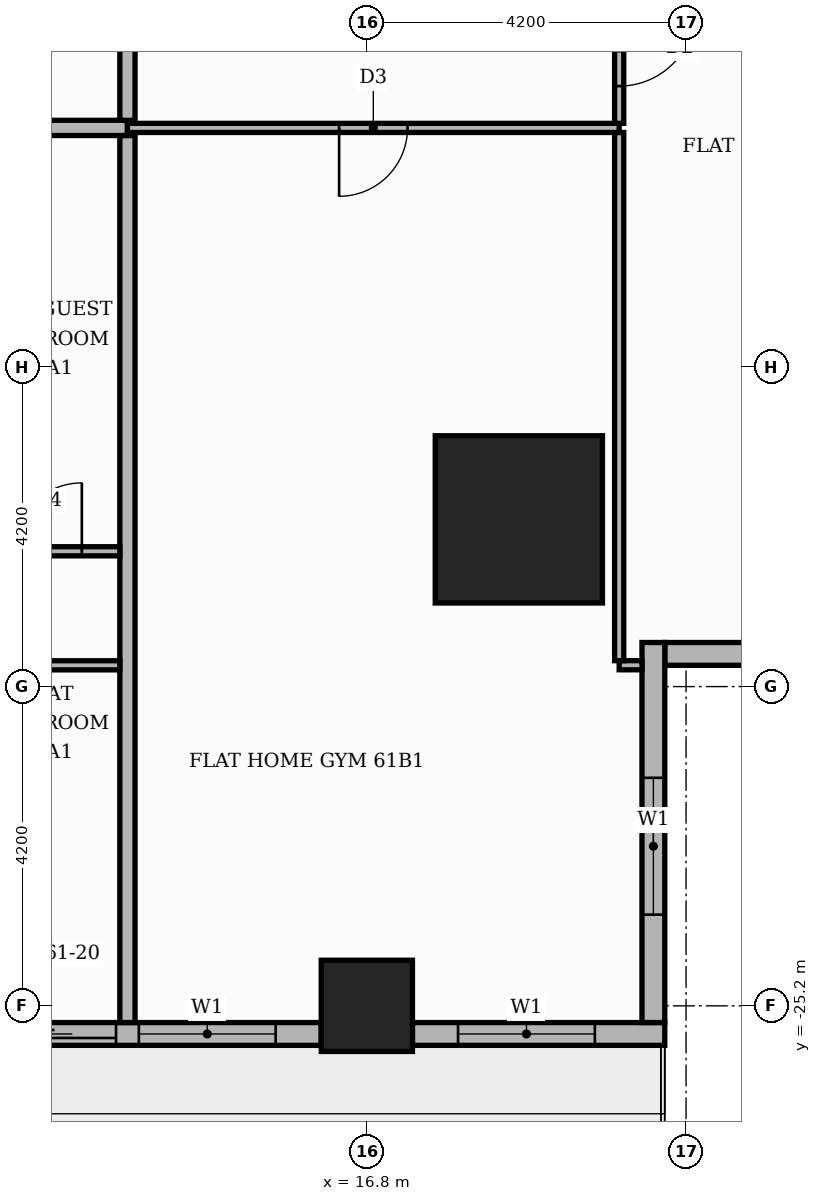
"""IFC4 building model, lengths in metres.
Left out: names, types, materials, properties, quantities, classifications, styles, units other than length and angle.
Written with IfcOpenShell. Run it as: python <this file> out.ifc"""

import sys

from ifc_helpers import new_model, si_unit, direction, frame, frame_2d, origin, origin_2d, place, context, subcontext, project, spatial, rectangle, extrude, element, fill, save


model = new_model("IFC4")
c1 = context("Model", 3, precision=1e-05, world=origin(), true_north=direction((0.0, 1.0)))
c2 = subcontext(c1, "Body", "Model", "MODEL_VIEW")
j1 = project(units=[si_unit("LENGTHUNIT", "METRE"), si_unit("PLANEANGLEUNIT", "RADIAN")], contexts=[c1])
p1 = place(None, origin())
s1 = spatial("IfcSite", under=j1, at=p1, CompositionType="ELEMENT")
p2 = place(p1, origin())
s2 = spatial("IfcBuilding", under=s1, at=p2, CompositionType="ELEMENT")
p3 = place(p2, frame((0.0, 0.0, 256.2)))
s3 = spatial("IfcBuildingStorey", under=s2, at=p3, CompositionType="ELEMENT", Elevation=256.2)
p4 = place(p3, frame((18.8, -18.8, 0.0), z_axis=(0.0, 0.0, 1.0), x_axis=(1.0, 0.0, 0.0)))
e1 = element("IfcColumn", 1, at=p4, inside=s3, PredefinedType="COLUMN", context=c2, shape_type="SweptSolid", body=[
    extrude(rectangle(XDim=2.2, YDim=2.2, at=origin_2d()), origin(), (0.0, 0.0, 1.0), 3.9),
])
p5 = place(p3, frame((16.8, -25.2, 0.0), z_axis=(0.0, 0.0, 1.0), x_axis=(1.0, 0.0, 0.0)))
e2 = element("IfcColumn", 2, at=p5, inside=s3, PredefinedType="COLUMN", context=c2, shape_type="SweptSolid", body=[
    extrude(rectangle(XDim=1.2, YDim=1.2, at=origin_2d()), origin(), (0.0, 0.0, 1.0), 3.9),
])
p6 = place(p3, frame((20.72, -20.57, 0.0), z_axis=(0.0, 0.0, 1.0), x_axis=(1.0, 0.0, 0.0)))
e3 = element("IfcWall", 3, at=p6, inside=s3, PredefinedType="STANDARD", context=c2, shape_type="SweptSolid", body=[
    extrude(rectangle(XDim=5.0, YDim=0.3, at=frame_2d((2.5, 0.0))), origin(), (0.0, 0.0, 1.0), 3.48),
])
p7 = place(p6, frame((1.48, 0.0, 0.9)))
e4 = element("IfcOpeningElement", 4, at=p7, cuts=e3, PredefinedType="OPENING", context=c2, shape_type="SweptSolid", body=[
    extrude(rectangle(XDim=1.8, YDim=2.1, at=frame_2d((0.9, 1.05))), frame((0.0, 0.16, 0.0), z_axis=(0.0, -1.0, 0.0), x_axis=(1.0, 0.0, 0.0)), (0.0, 0.0, 1.0), 0.32),
])
p8 = place(p3, frame((9.0, -25.57, 0.0), z_axis=(0.0, 0.0, 1.0), x_axis=(1.0, 0.0, 0.0)))
e5 = element("IfcWall", 5, at=p8, inside=s3, PredefinedType="STANDARD", context=c2, shape_type="SweptSolid", body=[
    extrude(rectangle(XDim=7.2, YDim=0.3, at=frame_2d((3.6, 0.0))), origin(), (0.0, 0.0, 1.0), 3.48),
])
p9 = place(p8, frame((0.6, 0.0, 0.9)))
e6 = element("IfcOpeningElement", 6, at=p9, cuts=e5, PredefinedType="OPENING", context=c2, shape_type="SweptSolid", body=[
    extrude(rectangle(XDim=1.8, YDim=2.1, at=frame_2d((0.9, 1.05))), frame((0.0, 0.16, 0.0), z_axis=(0.0, -1.0, 0.0), x_axis=(1.0, 0.0, 0.0)), (0.0, 0.0, 1.0), 0.32),
])
p10 = place(p8, frame((2.7, 0.0, 0.0)))
e7 = element("IfcOpeningElement", 7, at=p10, cuts=e5, PredefinedType="OPENING", context=c2, shape_type="SweptSolid", body=[
    extrude(rectangle(XDim=1.8, YDim=2.4, at=frame_2d((0.9, 1.2))), frame((0.0, 0.16, 0.0), z_axis=(0.0, -1.0, 0.0), x_axis=(1.0, 0.0, 0.0)), (0.0, 0.0, 1.0), 0.32),
])
p11 = place(p8, frame((4.8, 0.0, 0.9)))
e8 = element("IfcOpeningElement", 8, at=p11, cuts=e5, PredefinedType="OPENING", context=c2, shape_type="SweptSolid", body=[
    extrude(rectangle(XDim=1.8, YDim=2.1, at=frame_2d((0.9, 1.05))), frame((0.0, 0.16, 0.0), z_axis=(0.0, -1.0, 0.0), x_axis=(1.0, 0.0, 0.0)), (0.0, 0.0, 1.0), 0.32),
])
p12 = place(p3, frame((17.4, -25.57, 0.0), z_axis=(0.0, 0.0, 1.0), x_axis=(1.0, 0.0, 0.0)))
e9 = element("IfcWall", 9, at=p12, inside=s3, PredefinedType="STANDARD", context=c2, shape_type="SweptSolid", body=[
    extrude(rectangle(XDim=3.32, YDim=0.3, at=frame_2d((1.66, 0.0))), origin(), (0.0, 0.0, 1.0), 3.48),
])
p13 = place(p12, frame((0.6, 0.0, 0.9)))
e10 = element("IfcOpeningElement", 10, at=p13, cuts=e9, PredefinedType="OPENING", context=c2, shape_type="SweptSolid", body=[
    extrude(rectangle(XDim=1.8, YDim=2.1, at=frame_2d((0.9, 1.05))), frame((0.0, 0.16, 0.0), z_axis=(0.0, -1.0, 0.0), x_axis=(1.0, 0.0, 0.0)), (0.0, 0.0, 1.0), 0.32),
])
p14 = place(p3, frame((20.57, -25.42, 0.0), z_axis=(0.0, 0.0, 1.0), x_axis=(0.0, 1.0, 0.0)))
e11 = element("IfcWall", 11, at=p14, inside=s3, PredefinedType="STANDARD", context=c2, shape_type="SweptSolid", body=[
    extrude(rectangle(XDim=5.0, YDim=0.3, at=frame_2d((2.5, 0.0))), origin(), (0.0, 0.0, 1.0), 3.48),
])
p15 = place(p14, frame((1.42, 0.0, 0.9)))
e12 = element("IfcOpeningElement", 12, at=p15, cuts=e11, PredefinedType="OPENING", context=c2, shape_type="SweptSolid", body=[
    extrude(rectangle(XDim=1.8, YDim=2.1, at=frame_2d((0.9, 1.05))), frame((0.0, 0.16, 0.0), z_axis=(0.0, -1.0, 0.0), x_axis=(1.0, 0.0, 0.0)), (0.0, 0.0, 1.0), 0.32),
])
p16 = place(p3, frame((13.65, -25.42, 0.0), z_axis=(0.0, 0.0, 1.0), x_axis=(0.0, 1.0, 0.0)))
e13 = element("IfcWall", 13, at=p16, inside=s3, PredefinedType="PARTITIONING", context=c2, shape_type="SweptSolid", body=[
    extrude(rectangle(XDim=11.67, YDim=0.2, at=frame_2d((5.835, 0.0))), origin(), (0.0, 0.0, 1.0), 3.48),
])
p17 = place(p3, frame((7.65, -20.72, 0.0), z_axis=(0.0, 0.0, 1.0), x_axis=(1.0, 0.0, 0.0)))
e14 = element("IfcWall", 14, at=p17, inside=s3, PredefinedType="PARTITIONING", context=c2, shape_type="SweptSolid", body=[
    extrude(rectangle(XDim=5.9, YDim=0.12, at=frame_2d((2.95, 0.0))), origin(), (0.0, 0.0, 1.0), 3.48),
])
p18 = place(p17, frame((1.35, 0.0, 0.0)))
e15 = element("IfcOpeningElement", 15, at=p18, cuts=e14, PredefinedType="OPENING", context=c2, shape_type="SweptSolid", body=[
    extrude(rectangle(XDim=0.9, YDim=2.1, at=frame_2d((0.45, 1.05))), frame((0.0, 0.07, 0.0), z_axis=(0.0, -1.0, 0.0), x_axis=(1.0, 0.0, 0.0)), (0.0, 0.0, 1.0), 0.14),
])
p19 = place(p3, frame((20.12, -20.719, 0.0), z_axis=(0.0, 0.0, 1.0), x_axis=(1.0, 0.0, 0.0)))
e16 = element("IfcWall", 16, at=p19, inside=s3, PredefinedType="PARTITIONING", context=c2, shape_type="SweptSolid", body=[
    extrude(rectangle(XDim=0.301, YDim=0.12, at=frame_2d((0.15, 0.0))), origin(), (0.0, 0.0, 1.0), 3.48),
])
p20 = place(p3, frame((20.12, -20.659, 0.0), z_axis=(0.0, 0.0, 1.0), x_axis=(0.0, 1.0, 0.0)))
e17 = element("IfcWall", 17, at=p20, inside=s3, PredefinedType="PARTITIONING", context=c2, shape_type="SweptSolid", body=[
    extrude(rectangle(XDim=6.949, YDim=0.12, at=frame_2d((3.475, 0.0))), origin(), (0.0, 0.0, 1.0), 3.48),
])
p21 = place(p3, frame((-7.35, -19.22, 0.0), z_axis=(0.0, 0.0, 1.0), x_axis=(1.0, 0.0, 0.0)))
e18 = element("IfcWall", 18, at=p21, inside=s3, PredefinedType="PARTITIONING", context=c2, shape_type="SweptSolid", body=[
    extrude(rectangle(XDim=20.9, YDim=0.12, at=frame_2d((10.45, 0.0))), origin(), (0.0, 0.0, 1.0), 3.48),
])
p22 = place(p21, frame((2.7, 0.0, 0.0)))
e19 = element("IfcOpeningElement", 19, at=p22, cuts=e18, PredefinedType="OPENING", context=c2, shape_type="SweptSolid", body=[
    extrude(rectangle(XDim=0.9, YDim=2.1, at=frame_2d((0.45, 1.05))), frame((0.0, 0.07, 0.0), z_axis=(0.0, -1.0, 0.0), x_axis=(1.0, 0.0, 0.0)), (0.0, 0.0, 1.0), 0.14),
])
p23 = place(p21, frame((7.95, 0.0, 0.0)))
e20 = element("IfcOpeningElement", 20, at=p23, cuts=e18, PredefinedType="OPENING", context=c2, shape_type="SweptSolid", body=[
    extrude(rectangle(XDim=0.9, YDim=2.1, at=frame_2d((0.45, 1.05))), frame((0.0, 0.07, 0.0), z_axis=(0.0, -1.0, 0.0), x_axis=(1.0, 0.0, 0.0)), (0.0, 0.0, 1.0), 0.14),
])
p24 = place(p21, frame((13.05, 0.0, 0.0)))
e21 = element("IfcOpeningElement", 21, at=p24, cuts=e18, PredefinedType="OPENING", context=c2, shape_type="SweptSolid", body=[
    extrude(rectangle(XDim=0.9, YDim=2.1, at=frame_2d((0.45, 1.05))), frame((0.0, 0.07, 0.0), z_axis=(0.0, -1.0, 0.0), x_axis=(1.0, 0.0, 0.0)), (0.0, 0.0, 1.0), 0.14),
])
p25 = place(p21, frame((17.25, 0.0, 0.0)))
e22 = element("IfcOpeningElement", 22, at=p25, cuts=e18, PredefinedType="OPENING", context=c2, shape_type="SweptSolid", body=[
    extrude(rectangle(XDim=0.9, YDim=2.1, at=frame_2d((0.45, 1.05))), frame((0.0, 0.07, 0.0), z_axis=(0.0, -1.0, 0.0), x_axis=(1.0, 0.0, 0.0)), (0.0, 0.0, 1.0), 0.14),
])
p26 = place(p21, frame((19.5, 0.0, 0.0)))
e23 = element("IfcOpeningElement", 23, at=p26, cuts=e18, PredefinedType="OPENING", context=c2, shape_type="SweptSolid", body=[
    extrude(rectangle(XDim=0.9, YDim=2.1, at=frame_2d((0.45, 1.05))), frame((0.0, 0.07, 0.0), z_axis=(0.0, -1.0, 0.0), x_axis=(1.0, 0.0, 0.0)), (0.0, 0.0, 1.0), 0.14),
])
p27 = place(p3, frame((-25.42, -13.65, 0.0), z_axis=(0.0, 0.0, 1.0), x_axis=(1.0, 0.0, 0.0)))
e24 = element("IfcWall", 24, at=p27, inside=s3, PredefinedType="PARTITIONING", context=c2, shape_type="SweptSolid", body=[
    extrude(rectangle(XDim=39.07, YDim=0.2, at=frame_2d((19.535, 0.0))), origin(), (0.0, 0.0, 1.0), 3.48),
])
p28 = place(p27, frame((14.37, 0.0, 0.0)))
e25 = element("IfcOpeningElement", 25, at=p28, cuts=e24, PredefinedType="OPENING", context=c2, shape_type="SweptSolid", body=[
    extrude(rectangle(XDim=1.1, YDim=2.4, at=frame_2d((0.55, 1.2))), frame((0.0, 0.11, 0.0), z_axis=(0.0, -1.0, 0.0), x_axis=(1.0, 0.0, 0.0)), (0.0, 0.0, 1.0), 0.22),
])
p29 = place(p3, frame((13.65, -13.65, 0.0), z_axis=(0.0, 0.0, 1.0), x_axis=(1.0, 0.0, 0.0)))
e26 = element("IfcWall", 26, at=p29, inside=s3, PredefinedType="PARTITIONING", context=c2, shape_type="SweptSolid", body=[
    extrude(rectangle(XDim=6.47, YDim=0.12, at=frame_2d((3.235, 0.0))), origin(), (0.0, 0.0, 1.0), 3.48),
])
p30 = place(p29, frame((2.785, 0.0, 0.0)))
e27 = element("IfcOpeningElement", 27, at=p30, cuts=e26, PredefinedType="OPENING", context=c2, shape_type="SweptSolid", body=[
    extrude(rectangle(XDim=0.9, YDim=2.1, at=frame_2d((0.45, 1.05))), frame((0.0, 0.07, 0.0), z_axis=(0.0, -1.0, 0.0), x_axis=(1.0, 0.0, 0.0)), (0.0, 0.0, 1.0), 0.14),
])
p31 = place(p3, frame((20.12, -13.59, 0.0), z_axis=(0.0, 0.0, 1.0), x_axis=(0.0, 1.0, 0.0)))
e28 = element("IfcWall", 28, at=p31, inside=s3, PredefinedType="PARTITIONING", context=c2, shape_type="SweptSolid", body=[
    extrude(rectangle(XDim=1.98, YDim=0.12, at=frame_2d((0.99, 0.0))), origin(), (0.0, 0.0, 1.0), 3.48),
])
p32 = place(p31, frame((0.49, 0.0, 0.0)))
e29 = element("IfcOpeningElement", 29, at=p32, cuts=e28, PredefinedType="OPENING", context=c2, shape_type="SweptSolid", body=[
    extrude(rectangle(XDim=1.0, YDim=2.1, at=frame_2d((0.5, 1.05))), frame((0.0, 0.07, 0.0), z_axis=(0.0, -1.0, 0.0), x_axis=(1.0, 0.0, 0.0)), (0.0, 0.0, 1.0), 0.14),
])
p33 = place(p3, frame((13.65, -13.55, 0.0), z_axis=(0.0, 0.0, 1.0), x_axis=(0.0, 1.0, 0.0)))
e30 = element("IfcWall", 30, at=p33, inside=s3, PredefinedType="PARTITIONING", context=c2, shape_type="SweptSolid", body=[
    extrude(rectangle(XDim=2.45, YDim=0.2, at=frame_2d((1.225, 0.0))), origin(), (0.0, 0.0, 1.0), 3.48),
])
p34 = place(p10, origin())
e31 = element("IfcDoor", 31, at=p34, inside=s3, OperationType="SLIDING_TO_RIGHT", PredefinedType="DOOR", context=c2, shape_type="SweptSolid", body=[
    extrude(rectangle(XDim=1.8, YDim=2.4, at=frame_2d((0.9, 1.2))), frame((0.0, 0.025, 0.0), z_axis=(0.0, -1.0, 0.0), x_axis=(1.0, 0.0, 0.0)), (0.0, 0.0, 1.0), 0.05),
])
fill(e7, e31)
p35 = place(p11, origin())
e32 = element("IfcWindow", 32, at=p35, inside=s3, PartitioningType="SINGLE_PANEL", PredefinedType="WINDOW", context=c2, shape_type="SweptSolid", body=[
    extrude(rectangle(XDim=1.8, YDim=2.1, at=frame_2d((0.9, 1.05))), frame((0.0, 0.03, 0.0), z_axis=(0.0, -1.0, 0.0), x_axis=(1.0, 0.0, 0.0)), (0.0, 0.0, 1.0), 0.06),
])
fill(e8, e32)
p36 = place(p13, origin())
e33 = element("IfcWindow", 33, at=p36, inside=s3, PartitioningType="SINGLE_PANEL", PredefinedType="WINDOW", context=c2, shape_type="SweptSolid", body=[
    extrude(rectangle(XDim=1.8, YDim=2.1, at=frame_2d((0.9, 1.05))), frame((0.0, 0.03, 0.0), z_axis=(0.0, -1.0, 0.0), x_axis=(1.0, 0.0, 0.0)), (0.0, 0.0, 1.0), 0.06),
])
fill(e10, e33)
p37 = place(p15, origin())
e34 = element("IfcWindow", 34, at=p37, inside=s3, PartitioningType="SINGLE_PANEL", PredefinedType="WINDOW", context=c2, shape_type="SweptSolid", body=[
    extrude(rectangle(XDim=1.8, YDim=2.1, at=frame_2d((0.9, 1.05))), frame((0.0, 0.03, 0.0), z_axis=(0.0, -1.0, 0.0), x_axis=(1.0, 0.0, 0.0)), (0.0, 0.0, 1.0), 0.06),
])
fill(e12, e34)
p38 = place(p26, origin())
e35 = element("IfcDoor", 35, at=p38, inside=s3, OperationType="SINGLE_SWING_RIGHT", PredefinedType="DOOR", context=c2, shape_type="SweptSolid", body=[
    extrude(rectangle(XDim=0.9, YDim=2.1, at=frame_2d((0.45, 1.05))), frame((0.0, 0.025, 0.0), z_axis=(0.0, -1.0, 0.0), x_axis=(1.0, 0.0, 0.0)), (0.0, 0.0, 1.0), 0.05),
])
fill(e23, e35)
p39 = place(p30, frame((0.9, 0.0, 0.0), z_axis=(0.0, 0.0, 1.0), x_axis=(-1.0, 0.0, 0.0)))
e36 = element("IfcDoor", 36, at=p39, inside=s3, OperationType="SINGLE_SWING_LEFT", PredefinedType="DOOR", context=c2, shape_type="SweptSolid", body=[
    extrude(rectangle(XDim=0.9, YDim=2.1, at=frame_2d((0.45, 1.05))), frame((0.0, 0.025, 0.0), z_axis=(0.0, -1.0, 0.0), x_axis=(1.0, 0.0, 0.0)), (0.0, 0.0, 1.0), 0.05),
])
fill(e27, e36)
p40 = place(p32, frame((1.0, 0.0, 0.0), z_axis=(0.0, 0.0, 1.0), x_axis=(-1.0, 0.0, 0.0)))
e37 = element("IfcDoor", 37, at=p40, inside=s3, OperationType="SINGLE_SWING_RIGHT", PredefinedType="DOOR", context=c2, shape_type="SweptSolid", body=[
    extrude(rectangle(XDim=1.0, YDim=2.1, at=frame_2d((0.5, 1.05))), frame((0.0, 0.025, 0.0), z_axis=(0.0, -1.0, 0.0), x_axis=(1.0, 0.0, 0.0)), (0.0, 0.0, 1.0), 0.05),
])
fill(e29, e37)
save(model, sys.argv[1])
